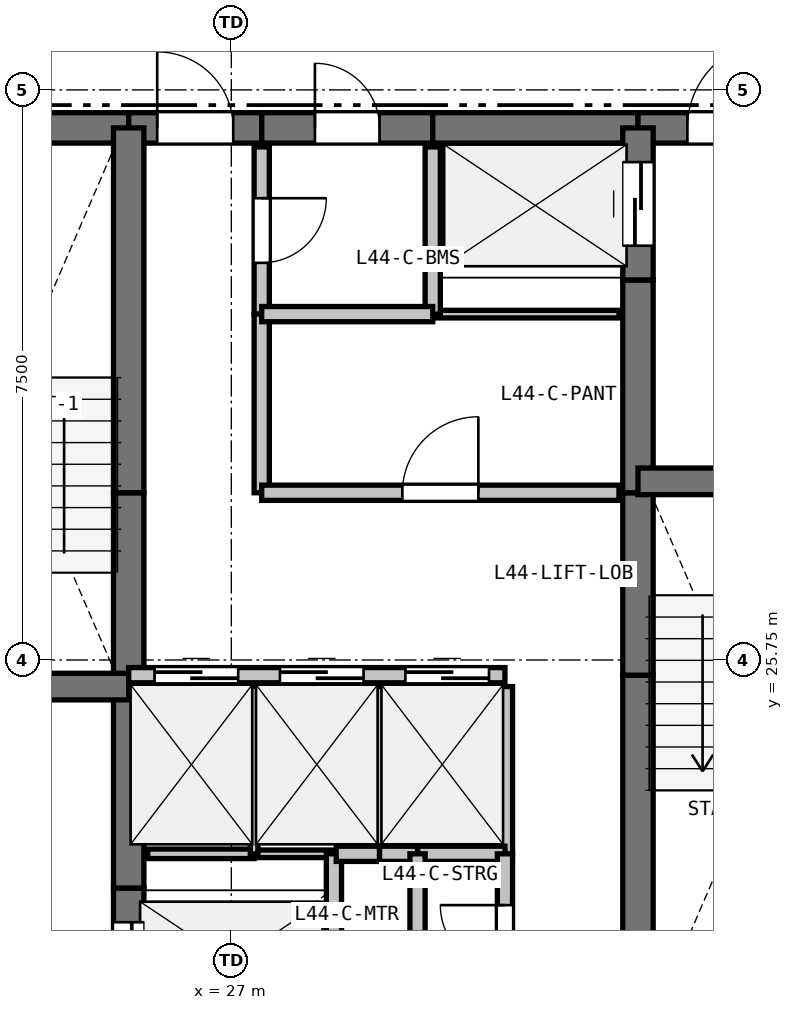
"""IFC4 building model, lengths in metres.
Left out: names, types, materials, properties, quantities, classifications, styles, units other than length and angle.
Written with IfcOpenShell. Run it as: python <this file> out.ifc"""

import sys

from ifc_helpers import new_model, si_unit, direction, frame, frame_2d, origin, place, context, subcontext, project, spatial, rectangle, extrude, element, fill, save


model = new_model("IFC4")
c1 = context("Model", 3, precision=1e-05, world=origin(), true_north=direction((0.0, 1.0)))
c2 = subcontext(c1, "Body", "Model", "MODEL_VIEW")
j1 = project(units=[si_unit("LENGTHUNIT", "METRE"), si_unit("PLANEANGLEUNIT", "RADIAN")], contexts=[c1])
p1 = place(None, origin())
s1 = spatial("IfcSite", under=j1, at=p1, CompositionType="ELEMENT")
p2 = place(p1, origin())
s2 = spatial("IfcBuilding", under=s1, at=p2, CompositionType="ELEMENT")
p3 = place(p2, frame((0.0, 0.0, 157.5)))
s3 = spatial("IfcBuildingStorey", under=s2, at=p3, CompositionType="ELEMENT", Elevation=157.5)
p4 = place(p3, frame((22.2, 32.75, 0.0), z_axis=(0.0, 0.0, 1.0), x_axis=(1.0, 0.0, 0.0)))
e1 = element("IfcWall", 1, at=p4, inside=s3, PredefinedType="SHEAR", context=c2, shape_type="SweptSolid", body=[
    extrude(rectangle(XDim=3.45, YDim=0.4, at=frame_2d((1.725, 0.0))), origin(), (0.0, 0.0, 1.0), 2.98),
])
p5 = place(p3, frame((25.65, 32.75, 0.0), z_axis=(0.0, 0.0, 1.0), x_axis=(1.0, 0.0, 0.0)))
e2 = element("IfcWall", 2, at=p5, inside=s3, PredefinedType="SHEAR", context=c2, shape_type="SweptSolid", body=[
    extrude(rectangle(XDim=1.75, YDim=0.4, at=frame_2d((0.875, 0.0))), origin(), (0.0, 0.0, 1.0), 2.98),
])
p6 = place(p5, frame((0.375, 0.0, 0.0)))
e3 = element("IfcOpeningElement", 3, at=p6, cuts=e2, PredefinedType="OPENING", context=c2, shape_type="SweptSolid", body=[
    extrude(rectangle(XDim=1.0, YDim=2.15, at=frame_2d((0.5, 1.075))), frame((0.0, 0.21, 0.0), z_axis=(0.0, -1.0, 0.0), x_axis=(1.0, 0.0, 0.0)), (0.0, 0.0, 1.0), 0.42),
])
p7 = place(p3, frame((27.4, 32.75, 0.0), z_axis=(0.0, 0.0, 1.0), x_axis=(1.0, 0.0, 0.0)))
e4 = element("IfcWall", 4, at=p7, inside=s3, PredefinedType="SHEAR", context=c2, shape_type="SweptSolid", body=[
    extrude(rectangle(XDim=2.25, YDim=0.4, at=frame_2d((1.125, 0.0))), origin(), (0.0, 0.0, 1.0), 2.98),
])
p8 = place(p7, frame((0.7, 0.0, 0.0)))
e5 = element("IfcOpeningElement", 5, at=p8, cuts=e4, PredefinedType="OPENING", context=c2, shape_type="SweptSolid", body=[
    extrude(rectangle(XDim=0.85, YDim=2.1, at=frame_2d((0.425, 1.05))), frame((0.0, 0.21, 0.0), z_axis=(0.0, -1.0, 0.0), x_axis=(1.0, 0.0, 0.0)), (0.0, 0.0, 1.0), 0.42),
])
p9 = place(p3, frame((29.65, 32.75, 0.0), z_axis=(0.0, 0.0, 1.0), x_axis=(1.0, 0.0, 0.0)))
e6 = element("IfcWall", 6, at=p9, inside=s3, PredefinedType="SHEAR", context=c2, shape_type="SweptSolid", body=[
    extrude(rectangle(XDim=2.7, YDim=0.4, at=frame_2d((1.35, 0.0))), origin(), (0.0, 0.0, 1.0), 2.98),
])
p10 = place(p3, frame((32.35, 32.75, 0.0), z_axis=(0.0, 0.0, 1.0), x_axis=(1.0, 0.0, 0.0)))
e7 = element("IfcWall", 7, at=p10, inside=s3, PredefinedType="SHEAR", context=c2, shape_type="SweptSolid", body=[
    extrude(rectangle(XDim=3.45, YDim=0.4, at=frame_2d((1.725, 0.0))), origin(), (0.0, 0.0, 1.0), 2.98),
])
p11 = place(p10, frame((0.65, 0.0, 0.0)))
e8 = element("IfcOpeningElement", 8, at=p11, cuts=e7, PredefinedType="OPENING", context=c2, shape_type="SweptSolid", body=[
    extrude(rectangle(XDim=1.15, YDim=2.15, at=frame_2d((0.575, 1.075))), frame((0.0, 0.21, 0.0), z_axis=(0.0, -1.0, 0.0), x_axis=(1.0, 0.0, 0.0)), (0.0, 0.0, 1.0), 0.42),
])
p12 = place(p3, frame((25.65, 20.75, 0.0), z_axis=(0.0, 0.0, 1.0), x_axis=(0.0, 1.0, 0.0)))
e9 = element("IfcWall", 9, at=p12, inside=s3, PredefinedType="SHEAR", context=c2, shape_type="SweptSolid", body=[
    extrude(rectangle(XDim=2.0, YDim=0.4, at=frame_2d((1.0, 0.0))), origin(), (0.0, 0.0, 1.0), 2.98),
])
p13 = place(p12, frame((0.45, 0.0, 0.0)))
e10 = element("IfcOpeningElement", 10, at=p13, cuts=e9, PredefinedType="OPENING", context=c2, shape_type="SweptSolid", body=[
    extrude(rectangle(XDim=1.1, YDim=2.15, at=frame_2d((0.55, 1.075))), frame((0.0, 0.21, 0.0), z_axis=(0.0, -1.0, 0.0), x_axis=(1.0, 0.0, 0.0)), (0.0, 0.0, 1.0), 0.42),
])
p14 = place(p3, frame((25.65, 22.75, 0.0), z_axis=(0.0, 0.0, 1.0), x_axis=(0.0, 1.0, 0.0)))
e11 = element("IfcWall", 11, at=p14, inside=s3, PredefinedType="SHEAR", context=c2, shape_type="SweptSolid", body=[
    extrude(rectangle(XDim=2.8, YDim=0.4, at=frame_2d((1.4, 0.0))), origin(), (0.0, 0.0, 1.0), 2.98),
])
p15 = place(p3, frame((25.65, 25.55, 0.0), z_axis=(0.0, 0.0, 1.0), x_axis=(0.0, 1.0, 0.0)))
e12 = element("IfcWall", 12, at=p15, inside=s3, PredefinedType="SHEAR", context=c2, shape_type="SweptSolid", body=[
    extrude(rectangle(XDim=2.4, YDim=0.4, at=frame_2d((1.2, 0.0))), origin(), (0.0, 0.0, 1.0), 2.98),
])
for number, where, z_axis, x_axis in (
    (13, (25.65, 27.95, 0.0), (0.0, 0.0, 1.0), (0.0, 1.0, 0.0)),
    (14, (32.35, 20.75, 0.0), (0.0, 0.0, 1.0), (0.0, 1.0, 0.0)),
):
    element("IfcWall", number, at=place(p3, frame(where, z_axis=z_axis, x_axis=x_axis)), inside=s3, PredefinedType="SHEAR", context=c2, shape_type="SweptSolid", body=[
        extrude(rectangle(XDim=4.8, YDim=0.4, at=frame_2d((2.4, 0.0))), origin(), (0.0, 0.0, 1.0), 2.98),
    ])
p16 = place(p3, frame((32.35, 25.55, 0.0), z_axis=(0.0, 0.0, 1.0), x_axis=(0.0, 1.0, 0.0)))
e15 = element("IfcWall", 15, at=p16, inside=s3, PredefinedType="SHEAR", context=c2, shape_type="SweptSolid", body=[
    extrude(rectangle(XDim=2.4, YDim=0.4, at=frame_2d((1.2, 0.0))), origin(), (0.0, 0.0, 1.0), 2.98),
])
p17 = place(p3, frame((32.35, 27.95, 0.0), z_axis=(0.0, 0.0, 1.0), x_axis=(0.0, 1.0, 0.0)))
e16 = element("IfcWall", 16, at=p17, inside=s3, PredefinedType="SHEAR", context=c2, shape_type="SweptSolid", body=[
    extrude(rectangle(XDim=2.8, YDim=0.4, at=frame_2d((1.4, 0.0))), origin(), (0.0, 0.0, 1.0), 2.98),
])
p18 = place(p3, frame((32.35, 30.75, 0.0), z_axis=(0.0, 0.0, 1.0), x_axis=(0.0, 1.0, 0.0)))
e17 = element("IfcWall", 17, at=p18, inside=s3, PredefinedType="SHEAR", context=c2, shape_type="SweptSolid", body=[
    extrude(rectangle(XDim=2.0, YDim=0.4, at=frame_2d((1.0, 0.0))), origin(), (0.0, 0.0, 1.0), 2.98),
])
p19 = place(p18, frame((0.45, 0.0, 0.0)))
e18 = element("IfcOpeningElement", 18, at=p19, cuts=e17, PredefinedType="OPENING", context=c2, shape_type="SweptSolid", body=[
    extrude(rectangle(XDim=1.1, YDim=2.15, at=frame_2d((0.55, 1.075))), frame((0.0, 0.21, 0.0), z_axis=(0.0, -1.0, 0.0), x_axis=(1.0, 0.0, 0.0)), (0.0, 0.0, 1.0), 0.42),
])
p20 = place(p3, frame((22.2, 25.4, 0.0), z_axis=(0.0, 0.0, 1.0), x_axis=(1.0, 0.0, 0.0)))
e19 = element("IfcWall", 19, at=p20, inside=s3, PredefinedType="SHEAR", context=c2, shape_type="SweptSolid", body=[
    extrude(rectangle(XDim=3.45, YDim=0.35, at=frame_2d((1.725, 0.0))), origin(), (0.0, 0.0, 1.0), 2.98),
])
p21 = place(p20, frame((1.15, 0.0, 0.0)))
e20 = element("IfcOpeningElement", 20, at=p21, cuts=e19, PredefinedType="OPENING", context=c2, shape_type="SweptSolid", body=[
    extrude(rectangle(XDim=1.15, YDim=2.15, at=frame_2d((0.575, 1.075))), frame((0.0, 0.185, 0.0), z_axis=(0.0, -1.0, 0.0), x_axis=(1.0, 0.0, 0.0)), (0.0, 0.0, 1.0), 0.37),
])
p22 = place(p3, frame((32.35, 28.1, 0.0), z_axis=(0.0, 0.0, 1.0), x_axis=(1.0, 0.0, 0.0)))
e21 = element("IfcWall", 21, at=p22, inside=s3, PredefinedType="SHEAR", context=c2, shape_type="SweptSolid", body=[
    extrude(rectangle(XDim=3.45, YDim=0.35, at=frame_2d((1.725, 0.0))), origin(), (0.0, 0.0, 1.0), 2.98),
])
p23 = place(p22, frame((1.15, 0.0, 0.0)))
e22 = element("IfcOpeningElement", 22, at=p23, cuts=e21, PredefinedType="OPENING", context=c2, shape_type="SweptSolid", body=[
    extrude(rectangle(XDim=1.15, YDim=2.15, at=frame_2d((0.575, 1.075))), frame((0.0, 0.185, 0.0), z_axis=(0.0, -1.0, 0.0), x_axis=(1.0, 0.0, 0.0)), (0.0, 0.0, 1.0), 0.37),
])
p24 = place(p3, frame((25.65, 25.55, 0.0), z_axis=(0.0, 0.0, 1.0), x_axis=(1.0, 0.0, 0.0)))
e23 = element("IfcWall", 23, at=p24, inside=s3, PredefinedType="PARTITIONING", context=c2, shape_type="SweptSolid", body=[
    extrude(rectangle(XDim=4.95, YDim=0.2, at=frame_2d((2.475, 0.0))), origin(), (0.0, 0.0, 1.0), 2.98),
])
p25 = place(p24, frame((0.34, 0.0, 0.0)))
e24 = element("IfcOpeningElement", 24, at=p25, cuts=e23, PredefinedType="OPENING", context=c2, shape_type="SweptSolid", body=[
    extrude(rectangle(XDim=1.1, YDim=2.15, at=frame_2d((0.55, 1.075))), frame((0.0, 0.11, 0.0), z_axis=(0.0, -1.0, 0.0), x_axis=(1.0, 0.0, 0.0)), (0.0, 0.0, 1.0), 0.22),
])
p26 = place(p24, frame((1.99, 0.0, 0.0)))
e25 = element("IfcOpeningElement", 25, at=p26, cuts=e23, PredefinedType="OPENING", context=c2, shape_type="SweptSolid", body=[
    extrude(rectangle(XDim=1.1, YDim=2.15, at=frame_2d((0.55, 1.075))), frame((0.0, 0.11, 0.0), z_axis=(0.0, -1.0, 0.0), x_axis=(1.0, 0.0, 0.0)), (0.0, 0.0, 1.0), 0.22),
])
p27 = place(p24, frame((3.64, 0.0, 0.0)))
e26 = element("IfcOpeningElement", 26, at=p27, cuts=e23, PredefinedType="OPENING", context=c2, shape_type="SweptSolid", body=[
    extrude(rectangle(XDim=1.1, YDim=2.15, at=frame_2d((0.55, 1.075))), frame((0.0, 0.11, 0.0), z_axis=(0.0, -1.0, 0.0), x_axis=(1.0, 0.0, 0.0)), (0.0, 0.0, 1.0), 0.22),
])
p28 = place(p3, frame((25.9, 23.2, 0.0), z_axis=(0.0, 0.0, 1.0), x_axis=(1.0, 0.0, 0.0)))
e27 = element("IfcWall", 27, at=p28, inside=s3, PredefinedType="PARTITIONING", context=c2, shape_type="SweptSolid", body=[
    extrude(rectangle(XDim=1.4, YDim=0.125, at=frame_2d((0.7, 0.0))), origin(), (0.0, 0.0, 1.0), 2.98),
])
p29 = place(p3, frame((27.3, 23.2, 0.0), z_axis=(0.0, 0.0, 1.0), x_axis=(1.0, 0.0, 0.0)))
e28 = element("IfcWall", 28, at=p29, inside=s3, PredefinedType="PARTITIONING", context=c2, shape_type="SweptSolid", body=[
    extrude(rectangle(XDim=1.05, YDim=0.1, at=frame_2d((0.525, 0.0))), origin(), (0.0, 0.0, 1.0), 2.98),
])
p30 = place(p3, frame((28.35, 23.2, 0.0), z_axis=(0.0, 0.0, 1.0), x_axis=(0.0, -1.0, 0.0)))
e29 = element("IfcWall", 29, at=p30, inside=s3, PredefinedType="PARTITIONING", context=c2, shape_type="SweptSolid", body=[
    extrude(rectangle(XDim=2.2, YDim=0.2, at=frame_2d((1.1, 0.0))), origin(), (0.0, 0.0, 1.0), 2.98),
])
p31 = place(p3, frame((32.1, 30.3, 0.0), z_axis=(0.0, 0.0, 1.0), x_axis=(-1.0, 0.0, 0.0)))
e30 = element("IfcWall", 30, at=p31, inside=s3, PredefinedType="PARTITIONING", context=c2, shape_type="SweptSolid", body=[
    extrude(rectangle(XDim=2.45, YDim=0.1, at=frame_2d((1.225, 0.0))), origin(), (0.0, 0.0, 1.0), 2.98),
])
p32 = place(p3, frame((29.65, 30.3, 0.0), z_axis=(0.0, 0.0, 1.0), x_axis=(0.0, 1.0, 0.0)))
e31 = element("IfcWall", 31, at=p32, inside=s3, PredefinedType="PARTITIONING", context=c2, shape_type="SweptSolid", body=[
    extrude(rectangle(XDim=2.2, YDim=0.2, at=frame_2d((1.1, 0.0))), origin(), (0.0, 0.0, 1.0), 2.98),
])
p33 = place(p3, frame((27.3, 25.4, 0.0), z_axis=(0.0, 0.0, 1.0), x_axis=(0.0, -1.0, 0.0)))
e32 = element("IfcWall", 32, at=p33, inside=s3, PredefinedType="PARTITIONING", context=c2, shape_type="SweptSolid", body=[
    extrude(rectangle(XDim=2.2, YDim=0.1, at=frame_2d((1.1, 0.0))), origin(), (0.0, 0.0, 1.0), 2.98),
])
p34 = place(p3, frame((28.95, 25.4, 0.0), z_axis=(0.0, 0.0, 1.0), x_axis=(0.0, -1.0, 0.0)))
e33 = element("IfcWall", 33, at=p34, inside=s3, PredefinedType="PARTITIONING", context=c2, shape_type="SweptSolid", body=[
    extrude(rectangle(XDim=2.2, YDim=0.125, at=frame_2d((1.1, 0.0))), origin(), (0.0, 0.0, 1.0), 2.98),
])
p35 = place(p3, frame((28.95, 23.2, 0.0), z_axis=(0.0, 0.0, 1.0), x_axis=(-1.0, 0.0, 0.0)))
e34 = element("IfcWall", 34, at=p35, inside=s3, PredefinedType="PARTITIONING", context=c2, shape_type="SweptSolid", body=[
    extrude(rectangle(XDim=0.57, YDim=0.2, at=frame_2d((0.285, 0.0))), origin(), (0.0, 0.0, 1.0), 2.98),
])
p36 = place(p3, frame((30.6, 25.4, 0.0), z_axis=(0.0, 0.0, 1.0), x_axis=(0.0, -1.0, 0.0)))
e35 = element("IfcWall", 35, at=p36, inside=s3, PredefinedType="PARTITIONING", context=c2, shape_type="SweptSolid", body=[
    extrude(rectangle(XDim=2.2, YDim=0.2, at=frame_2d((1.1, 0.0))), origin(), (0.0, 0.0, 1.0), 2.98),
])
p37 = place(p3, frame((30.6, 23.2, 0.0), z_axis=(0.0, 0.0, 1.0), x_axis=(-1.0, 0.0, 0.0)))
e36 = element("IfcWall", 36, at=p37, inside=s3, PredefinedType="PARTITIONING", context=c2, shape_type="SweptSolid", body=[
    extrude(rectangle(XDim=1.15, YDim=0.2, at=frame_2d((0.575, 0.0))), origin(), (0.0, 0.0, 1.0), 2.98),
])
p38 = place(p3, frame((29.45, 23.2, 0.0), z_axis=(0.0, 0.0, 1.0), x_axis=(-1.0, 0.0, 0.0)))
e37 = element("IfcWall", 37, at=p38, inside=s3, PredefinedType="PARTITIONING", context=c2, shape_type="SweptSolid", body=[
    extrude(rectangle(XDim=0.5, YDim=0.2, at=frame_2d((0.25, 0.0))), origin(), (0.0, 0.0, 1.0), 2.98),
])
p39 = place(p3, frame((30.6, 21.0, 0.0), z_axis=(0.0, 0.0, 1.0), x_axis=(0.0, 1.0, 0.0)))
e38 = element("IfcWall", 38, at=p39, inside=s3, PredefinedType="PARTITIONING", context=c2, shape_type="SweptSolid", body=[
    extrude(rectangle(XDim=2.2, YDim=0.2, at=frame_2d((1.1, 0.0))), origin(), (0.0, 0.0, 1.0), 2.98),
])
p40 = place(p39, frame((0.675, 0.0, 0.0)))
e39 = element("IfcOpeningElement", 39, at=p40, cuts=e38, PredefinedType="OPENING", context=c2, shape_type="SweptSolid", body=[
    extrude(rectangle(XDim=0.85, YDim=2.1, at=frame_2d((0.425, 1.05))), frame((0.0, 0.11, 0.0), z_axis=(0.0, -1.0, 0.0), x_axis=(1.0, 0.0, 0.0)), (0.0, 0.0, 1.0), 0.22),
])
p41 = place(p3, frame((27.4, 32.5, 0.0), z_axis=(0.0, 0.0, 1.0), x_axis=(0.0, -1.0, 0.0)))
e40 = element("IfcWall", 40, at=p41, inside=s3, PredefinedType="PARTITIONING", context=c2, shape_type="SweptSolid", body=[
    extrude(rectangle(XDim=2.2, YDim=0.2, at=frame_2d((1.1, 0.0))), origin(), (0.0, 0.0, 1.0), 2.98),
])
p42 = place(p41, frame((0.675, 0.0, 0.0)))
e41 = element("IfcOpeningElement", 41, at=p42, cuts=e40, PredefinedType="OPENING", context=c2, shape_type="SweptSolid", body=[
    extrude(rectangle(XDim=0.85, YDim=2.1, at=frame_2d((0.425, 1.05))), frame((0.0, 0.11, 0.0), z_axis=(0.0, -1.0, 0.0), x_axis=(1.0, 0.0, 0.0)), (0.0, 0.0, 1.0), 0.22),
])
p43 = place(p3, frame((27.4, 30.3, 0.0), z_axis=(0.0, 0.0, 1.0), x_axis=(0.0, -1.0, 0.0)))
e42 = element("IfcWall", 42, at=p43, inside=s3, PredefinedType="PARTITIONING", context=c2, shape_type="SweptSolid", body=[
    extrude(rectangle(XDim=2.35, YDim=0.2, at=frame_2d((1.175, 0.0))), origin(), (0.0, 0.0, 1.0), 2.98),
])
p44 = place(p3, frame((27.4, 27.95, 0.0), z_axis=(0.0, 0.0, 1.0), x_axis=(1.0, 0.0, 0.0)))
e43 = element("IfcWall", 43, at=p44, inside=s3, PredefinedType="PARTITIONING", context=c2, shape_type="SweptSolid", body=[
    extrude(rectangle(XDim=4.7, YDim=0.2, at=frame_2d((2.35, 0.0))), origin(), (0.0, 0.0, 1.0), 2.98),
])
p45 = place(p44, frame((1.85, 0.0, 0.0)))
e44 = element("IfcOpeningElement", 44, at=p45, cuts=e43, PredefinedType="OPENING", context=c2, shape_type="SweptSolid", body=[
    extrude(rectangle(XDim=1.0, YDim=2.15, at=frame_2d((0.5, 1.075))), frame((0.0, 0.11, 0.0), z_axis=(0.0, -1.0, 0.0), x_axis=(1.0, 0.0, 0.0)), (0.0, 0.0, 1.0), 0.22),
])
p46 = place(p3, frame((27.4, 30.3, 0.0), z_axis=(0.0, 0.0, 1.0), x_axis=(1.0, 0.0, 0.0)))
e45 = element("IfcWall", 45, at=p46, inside=s3, PredefinedType="PARTITIONING", context=c2, shape_type="SweptSolid", body=[
    extrude(rectangle(XDim=2.25, YDim=0.2, at=frame_2d((1.125, 0.0))), origin(), (0.0, 0.0, 1.0), 2.98),
])
p47 = place(p3, frame((29.45, 23.2, 0.0), z_axis=(0.0, 0.0, 1.0), x_axis=(0.0, -1.0, 0.0)))
e46 = element("IfcWall", 46, at=p47, inside=s3, PredefinedType="PARTITIONING", context=c2, shape_type="SweptSolid", body=[
    extrude(rectangle(XDim=2.2, YDim=0.2, at=frame_2d((1.1, 0.0))), origin(), (0.0, 0.0, 1.0), 2.98),
])
p48 = place(p25, origin())
e47 = element("IfcDoor", 47, at=p48, inside=s3, OperationType="SLIDING_TO_LEFT", PredefinedType="DOOR", context=c2, shape_type="SweptSolid", body=[
    extrude(rectangle(XDim=1.1, YDim=2.15, at=frame_2d((0.55, 1.075))), frame((0.0, 0.025, 0.0), z_axis=(0.0, -1.0, 0.0), x_axis=(1.0, 0.0, 0.0)), (0.0, 0.0, 1.0), 0.05),
])
fill(e24, e47)
p49 = place(p26, origin())
e48 = element("IfcDoor", 48, at=p49, inside=s3, OperationType="SLIDING_TO_LEFT", PredefinedType="DOOR", context=c2, shape_type="SweptSolid", body=[
    extrude(rectangle(XDim=1.1, YDim=2.15, at=frame_2d((0.55, 1.075))), frame((0.0, 0.025, 0.0), z_axis=(0.0, -1.0, 0.0), x_axis=(1.0, 0.0, 0.0)), (0.0, 0.0, 1.0), 0.05),
])
fill(e25, e48)
p50 = place(p27, origin())
e49 = element("IfcDoor", 49, at=p50, inside=s3, OperationType="SLIDING_TO_LEFT", PredefinedType="DOOR", context=c2, shape_type="SweptSolid", body=[
    extrude(rectangle(XDim=1.1, YDim=2.15, at=frame_2d((0.55, 1.075))), frame((0.0, 0.025, 0.0), z_axis=(0.0, -1.0, 0.0), x_axis=(1.0, 0.0, 0.0)), (0.0, 0.0, 1.0), 0.05),
])
fill(e26, e49)
p51 = place(p6, origin())
e50 = element("IfcDoor", 50, at=p51, inside=s3, OperationType="SINGLE_SWING_LEFT", PredefinedType="DOOR", context=c2, shape_type="SweptSolid", body=[
    extrude(rectangle(XDim=1.0, YDim=2.15, at=frame_2d((0.5, 1.075))), frame((0.0, 0.025, 0.0), z_axis=(0.0, -1.0, 0.0), x_axis=(1.0, 0.0, 0.0)), (0.0, 0.0, 1.0), 0.05),
])
fill(e3, e50)
p52 = place(p13, origin())
e51 = element("IfcDoor", 51, at=p52, inside=s3, OperationType="SLIDING_TO_LEFT", PredefinedType="DOOR", context=c2, shape_type="SweptSolid", body=[
    extrude(rectangle(XDim=1.1, YDim=2.15, at=frame_2d((0.55, 1.075))), frame((0.0, 0.025, 0.0), z_axis=(0.0, -1.0, 0.0), x_axis=(1.0, 0.0, 0.0)), (0.0, 0.0, 1.0), 0.05),
])
fill(e10, e51)
p53 = place(p19, origin())
e52 = element("IfcDoor", 52, at=p53, inside=s3, OperationType="SLIDING_TO_LEFT", PredefinedType="DOOR", context=c2, shape_type="SweptSolid", body=[
    extrude(rectangle(XDim=1.1, YDim=2.15, at=frame_2d((0.55, 1.075))), frame((0.0, 0.025, 0.0), z_axis=(0.0, -1.0, 0.0), x_axis=(1.0, 0.0, 0.0)), (0.0, 0.0, 1.0), 0.05),
])
fill(e18, e52)
p54 = place(p11, origin())
e53 = element("IfcDoor", 53, at=p54, inside=s3, OperationType="SINGLE_SWING_RIGHT", PredefinedType="DOOR", context=c2, shape_type="SweptSolid", body=[
    extrude(rectangle(XDim=1.15, YDim=2.15, at=frame_2d((0.575, 1.075))), frame((0.0, 0.025, 0.0), z_axis=(0.0, -1.0, 0.0), x_axis=(1.0, 0.0, 0.0)), (0.0, 0.0, 1.0), 0.05),
])
fill(e8, e53)
p55 = place(p45, origin())
e54 = element("IfcDoor", 54, at=p55, inside=s3, OperationType="SINGLE_SWING_RIGHT", PredefinedType="DOOR", context=c2, shape_type="SweptSolid", body=[
    extrude(rectangle(XDim=1.0, YDim=2.15, at=frame_2d((0.5, 1.075))), frame((0.0, 0.025, 0.0), z_axis=(0.0, -1.0, 0.0), x_axis=(1.0, 0.0, 0.0)), (0.0, 0.0, 1.0), 0.05),
])
fill(e44, e54)
p56 = place(p42, origin())
e55 = element("IfcDoor", 55, at=p56, inside=s3, OperationType="SINGLE_SWING_LEFT", PredefinedType="DOOR", context=c2, shape_type="SweptSolid", body=[
    extrude(rectangle(XDim=0.85, YDim=2.1, at=frame_2d((0.425, 1.05))), frame((0.0, 0.025, 0.0), z_axis=(0.0, -1.0, 0.0), x_axis=(1.0, 0.0, 0.0)), (0.0, 0.0, 1.0), 0.05),
])
fill(e41, e55)
p57 = place(p40, origin())
e56 = element("IfcDoor", 56, at=p57, inside=s3, OperationType="SINGLE_SWING_RIGHT", PredefinedType="DOOR", context=c2, shape_type="SweptSolid", body=[
    extrude(rectangle(XDim=0.85, YDim=2.1, at=frame_2d((0.425, 1.05))), frame((0.0, 0.025, 0.0), z_axis=(0.0, -1.0, 0.0), x_axis=(1.0, 0.0, 0.0)), (0.0, 0.0, 1.0), 0.05),
])
fill(e39, e56)
p58 = place(p8, origin())
e57 = element("IfcDoor", 57, at=p58, inside=s3, OperationType="SINGLE_SWING_LEFT", PredefinedType="DOOR", context=c2, shape_type="SweptSolid", body=[
    extrude(rectangle(XDim=0.85, YDim=2.1, at=frame_2d((0.425, 1.05))), frame((0.0, 0.025, 0.0), z_axis=(0.0, -1.0, 0.0), x_axis=(1.0, 0.0, 0.0)), (0.0, 0.0, 1.0), 0.05),
])
fill(e5, e57)
save(model, sys.argv[1])
